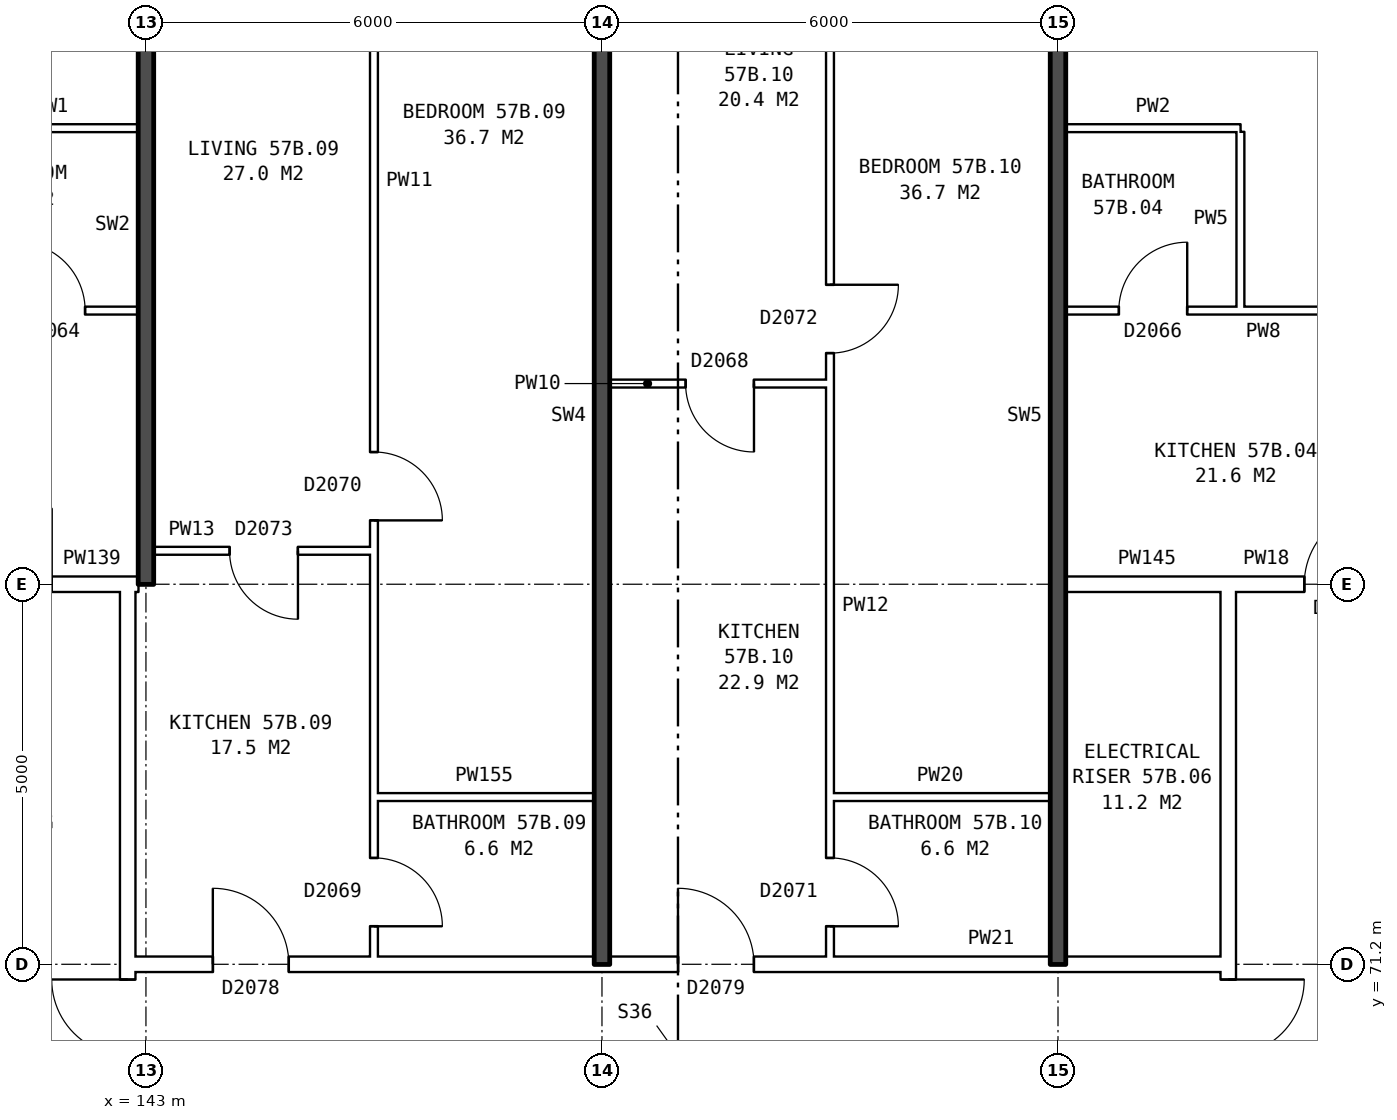
"""IFC4 building model, lengths in metres.
Left out: names, types, materials, properties, quantities, classifications, styles, units other than length and angle.
Written with IfcOpenShell. Run it as: python <this file> out.ifc"""

import sys

from ifc_helpers import new_model, si_unit, direction, frame, frame_2d, origin, place, context, subcontext, project, spatial, rectangle, extrude, element, fill, save


model = new_model("IFC4")
c1 = context("Model", 3, precision=1e-05, world=origin(), true_north=direction((0.0, 1.0)))
c2 = subcontext(c1, "Body", "Model", "MODEL_VIEW")
j1 = project(units=[si_unit("LENGTHUNIT", "METRE"), si_unit("PLANEANGLEUNIT", "RADIAN")], contexts=[c1])
p1 = place(None, origin())
s1 = spatial("IfcSite", under=j1, at=p1, CompositionType="ELEMENT")
p2 = place(p1, origin())
s2 = spatial("IfcBuilding", under=s1, at=p2, CompositionType="ELEMENT")
p3 = place(p2, frame((0.0, 0.0, 202.8)))
s3 = spatial("IfcBuildingStorey", under=s2, at=p3, CompositionType="ELEMENT", Elevation=202.8)
p4 = place(p3, frame((142.76, 63.9, 0.0), z_axis=(0.0, 0.0, 1.0), x_axis=(0.0, 1.0, 0.0)))
e1 = element("IfcWall", 1, at=p4, inside=s3, PredefinedType="PARTITIONING", context=c2, shape_type="SweptSolid", body=[
    extrude(rectangle(XDim=12.2, YDim=0.2, at=frame_2d((6.1, 0.0))), origin(), (0.0, 0.0, 1.0), 2.85),
])
p5 = place(p4, frame((5.1, 0.0, 0.0)))
e2 = element("IfcOpeningElement", 2, at=p5, cuts=e1, PredefinedType="OPENING", context=c2, shape_type="SweptSolid", body=[
    extrude(rectangle(XDim=2.0, YDim=2.1, at=frame_2d((1.0, 1.05))), frame((0.0, 0.11, 0.0), z_axis=(0.0, -1.0, 0.0), x_axis=(1.0, 0.0, 0.0)), (0.0, 0.0, 1.0), 0.22),
])
p6 = place(p3, frame((157.24, 63.9, 0.0), z_axis=(0.0, 0.0, 1.0), x_axis=(0.0, 1.0, 0.0)))
e3 = element("IfcWall", 3, at=p6, inside=s3, PredefinedType="PARTITIONING", context=c2, shape_type="SweptSolid", body=[
    extrude(rectangle(XDim=12.2, YDim=0.2, at=frame_2d((6.1, 0.0))), origin(), (0.0, 0.0, 1.0), 2.85),
])
p7 = place(p6, frame((5.1, 0.0, 0.0)))
e4 = element("IfcOpeningElement", 4, at=p7, cuts=e3, PredefinedType="OPENING", context=c2, shape_type="SweptSolid", body=[
    extrude(rectangle(XDim=2.0, YDim=2.1, at=frame_2d((1.0, 1.05))), frame((0.0, 0.11, 0.0), z_axis=(0.0, -1.0, 0.0), x_axis=(1.0, 0.0, 0.0)), (0.0, 0.0, 1.0), 0.22),
])
p8 = place(p3, frame((142.76, 71.2, 0.0), z_axis=(0.0, 0.0, 1.0), x_axis=(1.0, 0.0, 0.0)))
e5 = element("IfcWall", 5, at=p8, inside=s3, PredefinedType="PARTITIONING", context=c2, shape_type="SweptSolid", body=[
    extrude(rectangle(XDim=14.48, YDim=0.2, at=frame_2d((7.24, 0.0))), origin(), (0.0, 0.0, 1.0), 2.85),
])
p9 = place(p8, frame((1.12, 0.0, 0.0)))
e6 = element("IfcOpeningElement", 6, at=p9, cuts=e5, PredefinedType="OPENING", context=c2, shape_type="SweptSolid", body=[
    extrude(rectangle(XDim=1.0, YDim=2.1, at=frame_2d((0.5, 1.05))), frame((0.0, 0.11, 0.0), z_axis=(0.0, -1.0, 0.0), x_axis=(1.0, 0.0, 0.0)), (0.0, 0.0, 1.0), 0.22),
])
p10 = place(p8, frame((7.24, 0.0, 0.0)))
e7 = element("IfcOpeningElement", 7, at=p10, cuts=e5, PredefinedType="OPENING", context=c2, shape_type="SweptSolid", body=[
    extrude(rectangle(XDim=1.0, YDim=2.1, at=frame_2d((0.5, 1.05))), frame((0.0, 0.11, 0.0), z_axis=(0.0, -1.0, 0.0), x_axis=(1.0, 0.0, 0.0)), (0.0, 0.0, 1.0), 0.22),
])
for number, where, z_axis, x_axis in (
    (8, (146.0, 73.4, 0.0), (0.0, 0.0, 1.0), (1.0, 0.0, 0.0)),
    (9, (152.0, 73.4, 0.0), (0.0, 0.0, 1.0), (1.0, 0.0, 0.0)),
):
    element("IfcWall", number, at=place(p3, frame(where, z_axis=z_axis, x_axis=x_axis)), inside=s3, PredefinedType="PARTITIONING", context=c2, shape_type="SweptSolid", body=[
        extrude(rectangle(XDim=2.9, YDim=0.1, at=frame_2d((1.45, 0.0))), origin(), (0.0, 0.0, 1.0), 2.85),
    ])
p11 = place(p3, frame((139.76, 76.2, 0.0), z_axis=(0.0, 0.0, 1.0), x_axis=(1.0, 0.0, 0.0)))
e10 = element("IfcWall", 10, at=p11, inside=s3, PredefinedType="PARTITIONING", context=c2, shape_type="SweptSolid", body=[
    extrude(rectangle(XDim=3.0, YDim=0.2, at=frame_2d((1.5, 0.0))), origin(), (0.0, 0.0, 1.0), 2.85),
])
p12 = place(p11, frame((1.0, 0.0, 0.0)))
e11 = element("IfcOpeningElement", 11, at=p12, cuts=e10, PredefinedType="OPENING", context=c2, shape_type="SweptSolid", body=[
    extrude(rectangle(XDim=1.0, YDim=2.1, at=frame_2d((0.5, 1.05))), frame((0.0, 0.11, 0.0), z_axis=(0.0, -1.0, 0.0), x_axis=(1.0, 0.0, 0.0)), (0.0, 0.0, 1.0), 0.22),
])
p13 = place(p3, frame((142.76, 76.2, 0.0), z_axis=(0.0, 0.0, 1.0), x_axis=(1.0, 0.0, 0.0)))
e12 = element("IfcWall", 12, at=p13, inside=s3, PredefinedType="PARTITIONING", context=c2, shape_type="SweptSolid", body=[
    extrude(rectangle(XDim=0.14, YDim=0.2, at=frame_2d((0.07, 0.0))), origin(), (0.0, 0.0, 1.0), 2.85),
])
p14 = place(p3, frame((155.1, 76.2, 0.0), z_axis=(0.0, 0.0, 1.0), x_axis=(1.0, 0.0, 0.0)))
e13 = element("IfcWall", 13, at=p14, inside=s3, PredefinedType="PARTITIONING", context=c2, shape_type="SweptSolid", body=[
    extrude(rectangle(XDim=2.14, YDim=0.2, at=frame_2d((1.07, 0.0))), origin(), (0.0, 0.0, 1.0), 2.85),
])
p15 = place(p3, frame((157.24, 76.2, 0.0), z_axis=(0.0, 0.0, 1.0), x_axis=(1.0, 0.0, 0.0)))
e14 = element("IfcWall", 14, at=p15, inside=s3, PredefinedType="PARTITIONING", context=c2, shape_type="SweptSolid", body=[
    extrude(rectangle(XDim=3.0, YDim=0.2, at=frame_2d((1.5, 0.0))), origin(), (0.0, 0.0, 1.0), 2.85),
])
p16 = place(p15, frame((1.0, 0.0, 0.0)))
e15 = element("IfcOpeningElement", 15, at=p16, cuts=e14, PredefinedType="OPENING", context=c2, shape_type="SweptSolid", body=[
    extrude(rectangle(XDim=1.0, YDim=2.1, at=frame_2d((0.5, 1.05))), frame((0.0, 0.11, 0.0), z_axis=(0.0, -1.0, 0.0), x_axis=(1.0, 0.0, 0.0)), (0.0, 0.0, 1.0), 0.22),
])
p17 = place(p3, frame((143.1, 76.64, 0.0), z_axis=(0.0, 0.0, 1.0), x_axis=(1.0, 0.0, 0.0)))
e16 = element("IfcWall", 16, at=p17, inside=s3, PredefinedType="PARTITIONING", context=c2, shape_type="SweptSolid", body=[
    extrude(rectangle(XDim=2.9, YDim=0.1, at=frame_2d((1.45, 0.0))), origin(), (0.0, 0.0, 1.0), 2.85),
])
p18 = place(p17, frame((1.0, 0.0, 0.0)))
e17 = element("IfcOpeningElement", 17, at=p18, cuts=e16, PredefinedType="OPENING", context=c2, shape_type="SweptSolid", body=[
    extrude(rectangle(XDim=0.9, YDim=2.1, at=frame_2d((0.45, 1.05))), frame((0.0, 0.06, 0.0), z_axis=(0.0, -1.0, 0.0), x_axis=(1.0, 0.0, 0.0)), (0.0, 0.0, 1.0), 0.12),
])
p19 = place(p3, frame((149.1, 78.84, 0.0), z_axis=(0.0, 0.0, 1.0), x_axis=(1.0, 0.0, 0.0)))
e18 = element("IfcWall", 18, at=p19, inside=s3, PredefinedType="PARTITIONING", context=c2, shape_type="SweptSolid", body=[
    extrude(rectangle(XDim=2.9, YDim=0.1, at=frame_2d((1.45, 0.0))), origin(), (0.0, 0.0, 1.0), 2.85),
])
p20 = place(p19, frame((1.0, 0.0, 0.0)))
e19 = element("IfcOpeningElement", 19, at=p20, cuts=e18, PredefinedType="OPENING", context=c2, shape_type="SweptSolid", body=[
    extrude(rectangle(XDim=0.9, YDim=2.1, at=frame_2d((0.45, 1.05))), frame((0.0, 0.06, 0.0), z_axis=(0.0, -1.0, 0.0), x_axis=(1.0, 0.0, 0.0)), (0.0, 0.0, 1.0), 0.12),
])
p21 = place(p3, frame((137.1, 79.8, 0.0), z_axis=(0.0, 0.0, 1.0), x_axis=(1.0, 0.0, 0.0)))
e20 = element("IfcWall", 20, at=p21, inside=s3, PredefinedType="PARTITIONING", context=c2, shape_type="SweptSolid", body=[
    extrude(rectangle(XDim=5.8, YDim=0.1, at=frame_2d((2.9, 0.0))), origin(), (0.0, 0.0, 1.0), 2.85),
])
p22 = place(p21, frame((1.3, 0.0, 0.0)))
e21 = element("IfcOpeningElement", 21, at=p22, cuts=e20, PredefinedType="OPENING", context=c2, shape_type="SweptSolid", body=[
    extrude(rectangle(XDim=0.9, YDim=2.1, at=frame_2d((0.45, 1.05))), frame((0.0, 0.06, 0.0), z_axis=(0.0, -1.0, 0.0), x_axis=(1.0, 0.0, 0.0)), (0.0, 0.0, 1.0), 0.12),
])
p23 = place(p21, frame((4.2, 0.0, 0.0)))
e22 = element("IfcOpeningElement", 22, at=p23, cuts=e20, PredefinedType="OPENING", context=c2, shape_type="SweptSolid", body=[
    extrude(rectangle(XDim=0.9, YDim=2.1, at=frame_2d((0.45, 1.05))), frame((0.0, 0.06, 0.0), z_axis=(0.0, -1.0, 0.0), x_axis=(1.0, 0.0, 0.0)), (0.0, 0.0, 1.0), 0.12),
])
p24 = place(p3, frame((155.1, 79.8, 0.0), z_axis=(0.0, 0.0, 1.0), x_axis=(1.0, 0.0, 0.0)))
e23 = element("IfcWall", 23, at=p24, inside=s3, PredefinedType="PARTITIONING", context=c2, shape_type="SweptSolid", body=[
    extrude(rectangle(XDim=5.8, YDim=0.1, at=frame_2d((2.9, 0.0))), origin(), (0.0, 0.0, 1.0), 2.85),
])
p25 = place(p24, frame((3.6, 0.0, 0.0)))
e24 = element("IfcOpeningElement", 24, at=p25, cuts=e23, PredefinedType="OPENING", context=c2, shape_type="SweptSolid", body=[
    extrude(rectangle(XDim=0.9, YDim=2.1, at=frame_2d((0.45, 1.05))), frame((0.0, 0.06, 0.0), z_axis=(0.0, -1.0, 0.0), x_axis=(1.0, 0.0, 0.0)), (0.0, 0.0, 1.0), 0.12),
])
p26 = place(p24, frame((0.7, 0.0, 0.0)))
e25 = element("IfcOpeningElement", 25, at=p26, cuts=e23, PredefinedType="OPENING", context=c2, shape_type="SweptSolid", body=[
    extrude(rectangle(XDim=0.9, YDim=2.1, at=frame_2d((0.45, 1.05))), frame((0.0, 0.06, 0.0), z_axis=(0.0, -1.0, 0.0), x_axis=(1.0, 0.0, 0.0)), (0.0, 0.0, 1.0), 0.12),
])
for number, where, z_axis, x_axis in (
    (26, (140.6, 82.2, 0.0), (0.0, 0.0, 1.0), (1.0, 0.0, 0.0)),
    (27, (155.1, 82.2, 0.0), (0.0, 0.0, 1.0), (1.0, 0.0, 0.0)),
):
    element("IfcWall", number, at=place(p3, frame(where, z_axis=z_axis, x_axis=x_axis)), inside=s3, PredefinedType="PARTITIONING", context=c2, shape_type="SweptSolid", body=[
        extrude(rectangle(XDim=2.3, YDim=0.1, at=frame_2d((1.15, 0.0))), origin(), (0.0, 0.0, 1.0), 2.85),
    ])
p27 = place(p3, frame((143.0, 76.2, 0.0), z_axis=(0.0, 0.0, 1.0), x_axis=(0.0, 1.0, 0.0)))
e28 = element("IfcWall", 28, at=p27, inside=s3, PredefinedType="SOLIDWALL", context=c2, shape_type="SweptSolid", body=[
    extrude(rectangle(XDim=9.44, YDim=0.2, at=frame_2d((4.72, 0.0))), origin(), (0.0, 0.0, 1.0), 2.85),
])
p28 = place(p3, frame((146.0, 71.3, 0.0), z_axis=(0.0, 0.0, 1.0), x_axis=(0.0, 1.0, 0.0)))
e29 = element("IfcWall", 29, at=p28, inside=s3, PredefinedType="PARTITIONING", context=c2, shape_type="SweptSolid", body=[
    extrude(rectangle(XDim=14.34, YDim=0.1, at=frame_2d((7.17, 0.0))), origin(), (0.0, 0.0, 1.0), 2.85),
])
p29 = place(p28, frame((5.74, 0.0, 0.0)))
e30 = element("IfcOpeningElement", 30, at=p29, cuts=e29, PredefinedType="OPENING", context=c2, shape_type="SweptSolid", body=[
    extrude(rectangle(XDim=0.9, YDim=2.1, at=frame_2d((0.45, 1.05))), frame((0.0, 0.06, 0.0), z_axis=(0.0, -1.0, 0.0), x_axis=(1.0, 0.0, 0.0)), (0.0, 0.0, 1.0), 0.12),
])
p30 = place(p28, frame((0.4, 0.0, 0.0)))
e31 = element("IfcOpeningElement", 31, at=p30, cuts=e29, PredefinedType="OPENING", context=c2, shape_type="SweptSolid", body=[
    extrude(rectangle(XDim=0.9, YDim=2.1, at=frame_2d((0.45, 1.05))), frame((0.0, 0.06, 0.0), z_axis=(0.0, -1.0, 0.0), x_axis=(1.0, 0.0, 0.0)), (0.0, 0.0, 1.0), 0.12),
])
p31 = place(p3, frame((149.0, 71.2, 0.0), z_axis=(0.0, 0.0, 1.0), x_axis=(0.0, 1.0, 0.0)))
e32 = element("IfcWall", 32, at=p31, inside=s3, PredefinedType="SOLIDWALL", context=c2, shape_type="SweptSolid", body=[
    extrude(rectangle(XDim=14.44, YDim=0.2, at=frame_2d((7.22, 0.0))), origin(), (0.0, 0.0, 1.0), 2.85),
])
p32 = place(p3, frame((152.0, 71.3, 0.0), z_axis=(0.0, 0.0, 1.0), x_axis=(0.0, 1.0, 0.0)))
e33 = element("IfcWall", 33, at=p32, inside=s3, PredefinedType="PARTITIONING", context=c2, shape_type="SweptSolid", body=[
    extrude(rectangle(XDim=14.34, YDim=0.1, at=frame_2d((7.17, 0.0))), origin(), (0.0, 0.0, 1.0), 2.85),
])
p33 = place(p32, frame((7.94, 0.0, 0.0)))
e34 = element("IfcOpeningElement", 34, at=p33, cuts=e33, PredefinedType="OPENING", context=c2, shape_type="SweptSolid", body=[
    extrude(rectangle(XDim=0.9, YDim=2.1, at=frame_2d((0.45, 1.05))), frame((0.0, 0.06, 0.0), z_axis=(0.0, -1.0, 0.0), x_axis=(1.0, 0.0, 0.0)), (0.0, 0.0, 1.0), 0.12),
])
p34 = place(p32, frame((0.4, 0.0, 0.0)))
e35 = element("IfcOpeningElement", 35, at=p34, cuts=e33, PredefinedType="OPENING", context=c2, shape_type="SweptSolid", body=[
    extrude(rectangle(XDim=0.9, YDim=2.1, at=frame_2d((0.45, 1.05))), frame((0.0, 0.06, 0.0), z_axis=(0.0, -1.0, 0.0), x_axis=(1.0, 0.0, 0.0)), (0.0, 0.0, 1.0), 0.12),
])
p35 = place(p3, frame((155.0, 71.2, 0.0), z_axis=(0.0, 0.0, 1.0), x_axis=(0.0, 1.0, 0.0)))
e36 = element("IfcWall", 36, at=p35, inside=s3, PredefinedType="SOLIDWALL", context=c2, shape_type="SweptSolid", body=[
    extrude(rectangle(XDim=14.44, YDim=0.2, at=frame_2d((7.22, 0.0))), origin(), (0.0, 0.0, 1.0), 2.85),
])
p36 = place(p3, frame((157.4, 79.85, 0.0), z_axis=(0.0, 0.0, 1.0), x_axis=(0.0, 1.0, 0.0)))
e37 = element("IfcWall", 37, at=p36, inside=s3, PredefinedType="PARTITIONING", context=c2, shape_type="SweptSolid", body=[
    extrude(rectangle(XDim=2.3, YDim=0.1, at=frame_2d((1.15, 0.0))), origin(), (0.0, 0.0, 1.0), 2.85),
])
p37 = place(p5, origin())
e38 = element("IfcDoor", 38, at=p37, inside=s3, OperationType="DOUBLE_DOOR_SINGLE_SWING", PredefinedType="DOOR", context=c2, shape_type="SweptSolid", body=[
    extrude(rectangle(XDim=2.0, YDim=2.1, at=frame_2d((1.0, 1.05))), frame((0.0, 0.025, 0.0), z_axis=(0.0, -1.0, 0.0), x_axis=(1.0, 0.0, 0.0)), (0.0, 0.0, 1.0), 0.05),
])
fill(e2, e38)
p38 = place(p7, frame((2.0, 0.0, 0.0), z_axis=(0.0, 0.0, 1.0), x_axis=(-1.0, 0.0, 0.0)))
e39 = element("IfcDoor", 39, at=p38, inside=s3, OperationType="DOUBLE_DOOR_SINGLE_SWING", PredefinedType="DOOR", context=c2, shape_type="SweptSolid", body=[
    extrude(rectangle(XDim=2.0, YDim=2.1, at=frame_2d((1.0, 1.05))), frame((0.0, 0.025, 0.0), z_axis=(0.0, -1.0, 0.0), x_axis=(1.0, 0.0, 0.0)), (0.0, 0.0, 1.0), 0.05),
])
fill(e4, e39)
p39 = place(p23, origin())
e40 = element("IfcDoor", 40, at=p39, inside=s3, OperationType="SINGLE_SWING_LEFT", PredefinedType="DOOR", context=c2, shape_type="SweptSolid", body=[
    extrude(rectangle(XDim=0.9, YDim=2.1, at=frame_2d((0.45, 1.05))), frame((0.0, 0.025, 0.0), z_axis=(0.0, -1.0, 0.0), x_axis=(1.0, 0.0, 0.0)), (0.0, 0.0, 1.0), 0.05),
])
fill(e22, e40)
p40 = place(p16, origin())
e41 = element("IfcDoor", 41, at=p40, inside=s3, OperationType="SINGLE_SWING_RIGHT", PredefinedType="DOOR", context=c2, shape_type="SweptSolid", body=[
    extrude(rectangle(XDim=1.0, YDim=2.1, at=frame_2d((0.5, 1.05))), frame((0.0, 0.025, 0.0), z_axis=(0.0, -1.0, 0.0), x_axis=(1.0, 0.0, 0.0)), (0.0, 0.0, 1.0), 0.05),
])
fill(e15, e41)
p41 = place(p26, origin())
e42 = element("IfcDoor", 42, at=p41, inside=s3, OperationType="SINGLE_SWING_RIGHT", PredefinedType="DOOR", context=c2, shape_type="SweptSolid", body=[
    extrude(rectangle(XDim=0.9, YDim=2.1, at=frame_2d((0.45, 1.05))), frame((0.0, 0.025, 0.0), z_axis=(0.0, -1.0, 0.0), x_axis=(1.0, 0.0, 0.0)), (0.0, 0.0, 1.0), 0.05),
])
fill(e25, e42)
p42 = place(p29, frame((0.9, 0.0, 0.0), z_axis=(0.0, 0.0, 1.0), x_axis=(-1.0, 0.0, 0.0)))
e43 = element("IfcDoor", 43, at=p42, inside=s3, OperationType="SINGLE_SWING_RIGHT", PredefinedType="DOOR", context=c2, shape_type="SweptSolid", body=[
    extrude(rectangle(XDim=0.9, YDim=2.1, at=frame_2d((0.45, 1.05))), frame((0.0, 0.025, 0.0), z_axis=(0.0, -1.0, 0.0), x_axis=(1.0, 0.0, 0.0)), (0.0, 0.0, 1.0), 0.05),
])
fill(e30, e43)
p43 = place(p9, origin())
e44 = element("IfcDoor", 44, at=p43, inside=s3, OperationType="SINGLE_SWING_LEFT", PredefinedType="DOOR", context=c2, shape_type="SweptSolid", body=[
    extrude(rectangle(XDim=1.0, YDim=2.1, at=frame_2d((0.5, 1.05))), frame((0.0, 0.025, 0.0), z_axis=(0.0, -1.0, 0.0), x_axis=(1.0, 0.0, 0.0)), (0.0, 0.0, 1.0), 0.05),
])
fill(e6, e44)
p44 = place(p18, frame((0.9, 0.0, 0.0), z_axis=(0.0, 0.0, 1.0), x_axis=(-1.0, 0.0, 0.0)))
e45 = element("IfcDoor", 45, at=p44, inside=s3, OperationType="SINGLE_SWING_LEFT", PredefinedType="DOOR", context=c2, shape_type="SweptSolid", body=[
    extrude(rectangle(XDim=0.9, YDim=2.1, at=frame_2d((0.45, 1.05))), frame((0.0, 0.025, 0.0), z_axis=(0.0, -1.0, 0.0), x_axis=(1.0, 0.0, 0.0)), (0.0, 0.0, 1.0), 0.05),
])
fill(e17, e45)
p45 = place(p30, frame((0.9, 0.0, 0.0), z_axis=(0.0, 0.0, 1.0), x_axis=(-1.0, 0.0, 0.0)))
e46 = element("IfcDoor", 46, at=p45, inside=s3, OperationType="SINGLE_SWING_RIGHT", PredefinedType="DOOR", context=c2, shape_type="SweptSolid", body=[
    extrude(rectangle(XDim=0.9, YDim=2.1, at=frame_2d((0.45, 1.05))), frame((0.0, 0.025, 0.0), z_axis=(0.0, -1.0, 0.0), x_axis=(1.0, 0.0, 0.0)), (0.0, 0.0, 1.0), 0.05),
])
fill(e31, e46)
p46 = place(p33, frame((0.9, 0.0, 0.0), z_axis=(0.0, 0.0, 1.0), x_axis=(-1.0, 0.0, 0.0)))
e47 = element("IfcDoor", 47, at=p46, inside=s3, OperationType="SINGLE_SWING_LEFT", PredefinedType="DOOR", context=c2, shape_type="SweptSolid", body=[
    extrude(rectangle(XDim=0.9, YDim=2.1, at=frame_2d((0.45, 1.05))), frame((0.0, 0.025, 0.0), z_axis=(0.0, -1.0, 0.0), x_axis=(1.0, 0.0, 0.0)), (0.0, 0.0, 1.0), 0.05),
])
fill(e34, e47)
p47 = place(p10, origin())
e48 = element("IfcDoor", 48, at=p47, inside=s3, OperationType="SINGLE_SWING_LEFT", PredefinedType="DOOR", context=c2, shape_type="SweptSolid", body=[
    extrude(rectangle(XDim=1.0, YDim=2.1, at=frame_2d((0.5, 1.05))), frame((0.0, 0.025, 0.0), z_axis=(0.0, -1.0, 0.0), x_axis=(1.0, 0.0, 0.0)), (0.0, 0.0, 1.0), 0.05),
])
fill(e7, e48)
p48 = place(p20, frame((0.9, 0.0, 0.0), z_axis=(0.0, 0.0, 1.0), x_axis=(-1.0, 0.0, 0.0)))
e49 = element("IfcDoor", 49, at=p48, inside=s3, OperationType="SINGLE_SWING_LEFT", PredefinedType="DOOR", context=c2, shape_type="SweptSolid", body=[
    extrude(rectangle(XDim=0.9, YDim=2.1, at=frame_2d((0.45, 1.05))), frame((0.0, 0.025, 0.0), z_axis=(0.0, -1.0, 0.0), x_axis=(1.0, 0.0, 0.0)), (0.0, 0.0, 1.0), 0.05),
])
fill(e19, e49)
p49 = place(p34, frame((0.9, 0.0, 0.0), z_axis=(0.0, 0.0, 1.0), x_axis=(-1.0, 0.0, 0.0)))
e50 = element("IfcDoor", 50, at=p49, inside=s3, OperationType="SINGLE_SWING_RIGHT", PredefinedType="DOOR", context=c2, shape_type="SweptSolid", body=[
    extrude(rectangle(XDim=0.9, YDim=2.1, at=frame_2d((0.45, 1.05))), frame((0.0, 0.025, 0.0), z_axis=(0.0, -1.0, 0.0), x_axis=(1.0, 0.0, 0.0)), (0.0, 0.0, 1.0), 0.05),
])
fill(e35, e50)
save(model, sys.argv[1])
